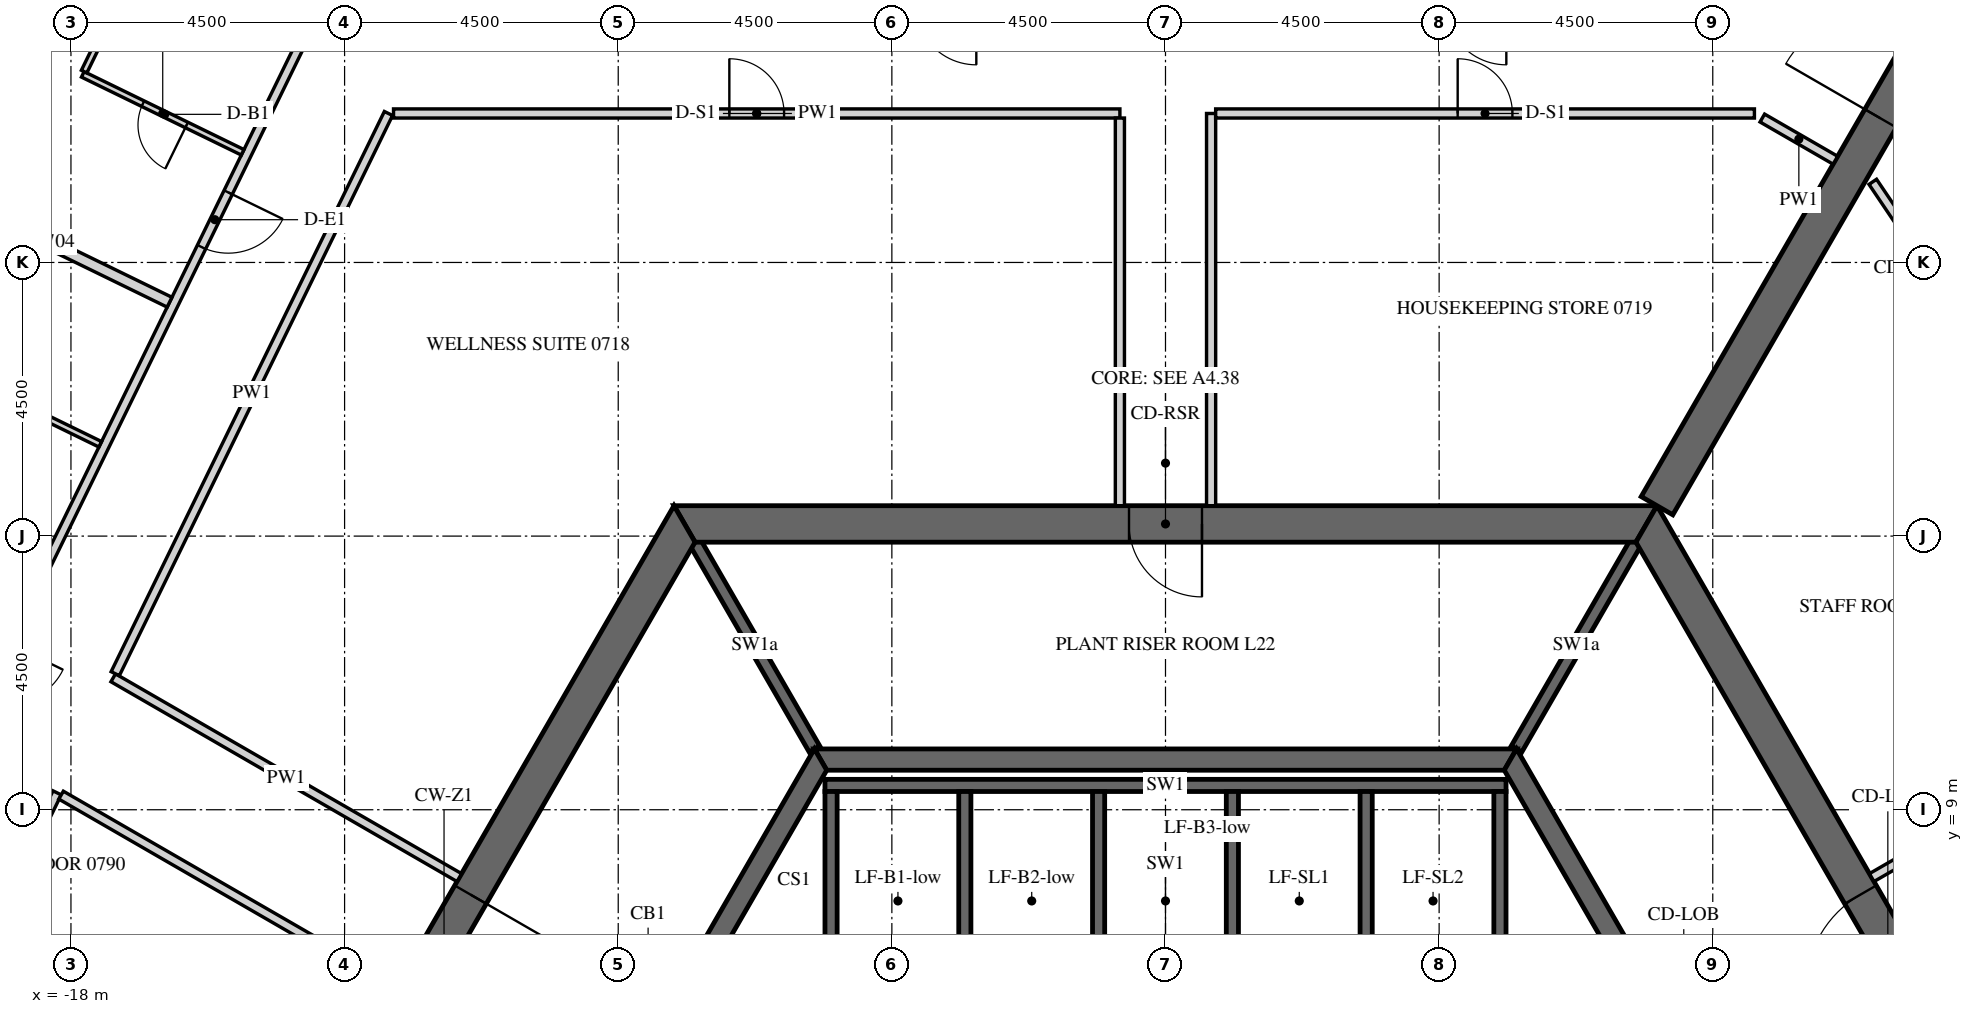
"""IFC4 building model, lengths in metres.
Left out: names, types, materials, properties, quantities, classifications, styles, units other than length and angle.
Written with IfcOpenShell. Run it as: python <this file> out.ifc"""

import sys

from ifc_helpers import new_model, si_unit, direction, frame, frame_2d, origin, place, context, subcontext, project, spatial, polyline, rectangle, outline, extrude, element, fill, save


model = new_model("IFC4")
c1 = context("Model", 3, precision=1e-05, world=origin(), true_north=direction((0.0, 1.0)))
c2 = subcontext(c1, "Body", "Model", "MODEL_VIEW")
j1 = project(units=[si_unit("LENGTHUNIT", "METRE"), si_unit("PLANEANGLEUNIT", "RADIAN")], contexts=[c1])
p1 = place(None, origin())
s1 = spatial("IfcSite", under=j1, at=p1, CompositionType="ELEMENT")
p2 = place(p1, origin())
s2 = spatial("IfcBuilding", under=s1, at=p2, CompositionType="ELEMENT")
p3 = place(p2, frame((0.0, 0.0, 99.9)))
s3 = spatial("IfcBuildingStorey", under=s2, at=p3, CompositionType="ELEMENT", Elevation=99.9)
p4 = place(p3, frame((-7.91, 13.7, -0.15), z_axis=(0.0, 0.0, 1.0), x_axis=(-0.499999880136, -0.866025472988, 0.0)))
e1 = element("IfcWall", 1, at=p4, inside=s3, PredefinedType="SHEAR", context=c2, shape_type="SweptSolid", body=[
    extrude(outline(polyline([(-0.173, -0.3), (15.993, -0.3), (15.646, 0.3), (0.173, 0.3), (-0.173, -0.3)])), origin(), (0.0, 0.0, 1.0), 3.9),
])
p5 = place(p4, frame((7.039, 0.0, 0.15)))
e2 = element("IfcOpeningElement", 2, at=p5, cuts=e1, PredefinedType="OPENING", context=c2, shape_type="SweptSolid", body=[
    extrude(rectangle(XDim=1.8, YDim=2.4, at=frame_2d((0.9, 1.2))), frame((0.0, 0.31, 0.0), z_axis=(0.0, -1.0, 0.0), x_axis=(1.0, 0.0, 0.0)), (0.0, 0.0, 1.0), 0.62),
])
p6 = place(p3, frame((15.819, 0.0, -0.15), z_axis=(0.0, 0.0, 1.0), x_axis=(-0.499999880136, 0.866025472988, 0.0)))
e3 = element("IfcWall", 3, at=p6, inside=s3, PredefinedType="SHEAR", context=c2, shape_type="SweptSolid", body=[
    extrude(outline(polyline([(-0.173, -0.3), (15.993, -0.3), (15.646, 0.3), (0.173, 0.3), (-0.173, -0.3)])), origin(), (0.0, 0.0, 1.0), 3.9),
])
p7 = place(p6, frame((6.981, 0.0, 0.15)))
e4 = element("IfcOpeningElement", 4, at=p7, cuts=e3, PredefinedType="OPENING", context=c2, shape_type="SweptSolid", body=[
    extrude(rectangle(XDim=1.8, YDim=2.4, at=frame_2d((0.9, 1.2))), frame((0.0, 0.31, 0.0), z_axis=(0.0, -1.0, 0.0), x_axis=(1.0, 0.0, 0.0)), (0.0, 0.0, 1.0), 0.62),
])
p8 = place(p3, frame((7.91, 13.7, -0.15), z_axis=(0.0, 0.0, 1.0), x_axis=(-1.0, 0.0, 0.0)))
e5 = element("IfcWall", 5, at=p8, inside=s3, PredefinedType="SHEAR", context=c2, shape_type="SweptSolid", body=[
    extrude(outline(polyline([(-0.173, -0.3), (15.993, -0.3), (15.646, 0.3), (0.173, 0.3), (-0.173, -0.3)])), origin(), (0.0, 0.0, 1.0), 3.9),
])
p9 = place(p8, frame((7.31, 0.0, 0.15)))
e6 = element("IfcOpeningElement", 6, at=p9, cuts=e5, PredefinedType="OPENING", context=c2, shape_type="SweptSolid", body=[
    extrude(rectangle(XDim=1.2, YDim=2.4, at=frame_2d((0.6, 1.2))), frame((0.0, 0.31, 0.0), z_axis=(0.0, -1.0, 0.0), x_axis=(1.0, 0.0, 0.0)), (0.0, 0.0, 1.0), 0.62),
])
p10 = place(p3, frame((8.083, 14.0, -0.15), z_axis=(0.0, 0.0, 1.0), x_axis=(0.499997680643, 0.866026742862, 0.0)))
e7 = element("IfcWall", 7, at=p10, inside=s3, PredefinedType="SHEAR", context=c2, shape_type="SweptSolid", body=[
    extrude(rectangle(XDim=16.509, YDim=0.6, at=frame_2d((8.254, 0.0))), origin(), (0.0, 0.0, 1.0), 3.9),
])
p11 = place(p10, frame((7.354, 0.0, 0.15)))
e8 = element("IfcOpeningElement", 8, at=p11, cuts=e7, PredefinedType="OPENING", context=c2, shape_type="SweptSolid", body=[
    extrude(rectangle(XDim=1.8, YDim=2.4, at=frame_2d((0.9, 1.2))), frame((0.0, 0.31, 0.0), z_axis=(0.0, -1.0, 0.0), x_axis=(1.0, 0.0, 0.0)), (0.0, 0.0, 1.0), 0.62),
])
p12 = place(p3, frame((-5.673, 9.825, -0.15), z_axis=(0.0, 0.0, 1.0), x_axis=(-0.499995046907, -0.866028263435, 0.0)))
e9 = element("IfcWall", 9, at=p12, inside=s3, PredefinedType="SHEAR", context=c2, shape_type="SweptSolid", body=[
    extrude(outline(polyline([(-0.101, -0.175), (11.446, -0.175), (11.244, 0.175), (0.101, 0.175), (-0.101, -0.175)])), origin(), (0.0, 0.0, 1.0), 3.9),
])
p13 = place(p12, frame((4.801, 0.0, 0.15)))
e10 = element("IfcOpeningElement", 10, at=p13, cuts=e9, PredefinedType="OPENING", context=c2, shape_type="SweptSolid", body=[
    extrude(rectangle(XDim=1.8, YDim=2.4, at=frame_2d((0.9, 1.2))), frame((0.0, 0.185, 0.0), z_axis=(0.0, -1.0, 0.0), x_axis=(1.0, 0.0, 0.0)), (0.0, 0.0, 1.0), 0.37),
])
p14 = place(p3, frame((11.345, 0.0, -0.15), z_axis=(0.0, 0.0, 1.0), x_axis=(-0.499995046907, 0.866028263435, 0.0)))
e11 = element("IfcWall", 11, at=p14, inside=s3, PredefinedType="SHEAR", context=c2, shape_type="SweptSolid", body=[
    extrude(outline(polyline([(-0.101, -0.175), (11.446, -0.175), (11.244, 0.175), (0.101, 0.175), (-0.101, -0.175)])), origin(), (0.0, 0.0, 1.0), 3.9),
])
p15 = place(p14, frame((4.744, 0.0, 0.15)))
e12 = element("IfcOpeningElement", 12, at=p15, cuts=e11, PredefinedType="OPENING", context=c2, shape_type="SweptSolid", body=[
    extrude(rectangle(XDim=1.8, YDim=2.4, at=frame_2d((0.9, 1.2))), frame((0.0, 0.185, 0.0), z_axis=(0.0, -1.0, 0.0), x_axis=(1.0, 0.0, 0.0)), (0.0, 0.0, 1.0), 0.37),
])
p16 = place(p3, frame((5.673, 9.825, -0.15), z_axis=(0.0, 0.0, 1.0), x_axis=(-1.0, 0.0, 0.0)))
e13 = element("IfcWall", 13, at=p16, inside=s3, PredefinedType="SHEAR", context=c2, shape_type="SweptSolid", body=[
    extrude(outline(polyline([(-0.101, -0.175), (11.446, -0.175), (11.244, 0.175), (0.101, 0.175), (-0.101, -0.175)])), origin(), (0.0, 0.0, 1.0), 3.9),
])
p17 = place(p3, frame((-5.6, 9.4, -0.25), z_axis=(0.0, 0.0, 1.0), x_axis=(1.0, 0.0, 0.0)))
e14 = element("IfcWall", 14, at=p17, inside=s3, PredefinedType="SHEAR", context=c2, shape_type="SweptSolid", body=[
    extrude(rectangle(XDim=11.2, YDim=0.2, at=frame_2d((5.6, 0.0))), origin(), (0.0, 0.0, 1.0), 3.9),
])
for number, where, z_axis, x_axis in (
    (15, (-5.5, 6.4, -0.25), (0.0, 0.0, 1.0), (0.0, 1.0, 0.0)),
    (16, (-3.3, 6.4, -0.25), (0.0, 0.0, 1.0), (0.0, 1.0, 0.0)),
    (17, (-1.1, 6.4, -0.25), (0.0, 0.0, 1.0), (0.0, 1.0, 0.0)),
    (18, (1.1, 6.4, -0.25), (0.0, 0.0, 1.0), (0.0, 1.0, 0.0)),
    (19, (3.3, 6.4, -0.25), (0.0, 0.0, 1.0), (0.0, 1.0, 0.0)),
    (20, (5.5, 6.4, -0.25), (0.0, 0.0, 1.0), (0.0, 1.0, 0.0)),
):
    element("IfcWall", number, at=place(p3, frame(where, z_axis=z_axis, x_axis=x_axis)), inside=s3, PredefinedType="SHEAR", context=c2, shape_type="SweptSolid", body=[
        extrude(rectangle(XDim=2.9, YDim=0.2, at=frame_2d((1.45, 0.0))), origin(), (0.0, 0.0, 1.0), 3.9),
    ])
for number, where, z_axis, x_axis in (
    (21, (5.773, 10.0, -0.15), (0.0, 0.0, 1.0), (0.5, 0.866, 0.0)),
    (22, (-5.773, 10.0, -0.15), (0.0, 0.0, 1.0), (-0.5, 0.866, 0.0)),
):
    element("IfcWall", number, at=place(p3, frame(where, z_axis=z_axis, x_axis=x_axis)), inside=s3, PredefinedType="SHEAR", context=c2, shape_type="SweptSolid", body=[
        extrude(rectangle(XDim=3.926, YDim=0.2, at=frame_2d((1.963, 0.0))), origin(), (0.0, 0.0, 1.0), 3.9),
    ])
p18 = place(p3, frame((-13.94, 22.175, 0.0), z_axis=(0.0, 0.0, 1.0), x_axis=(-0.438373022655, -0.898793131376, 0.0)))
e23 = element("IfcWall", 23, at=p18, inside=s3, PredefinedType="PARTITIONING", context=c2, shape_type="SweptSolid", body=[
    extrude(rectangle(XDim=22.335, YDim=0.15, at=frame_2d((11.168, 0.0))), origin(), (0.0, 0.0, 1.0), 2.988),
])
p19 = place(p18, frame((3.363, 0.0, 0.0)))
e24 = element("IfcOpeningElement", 24, at=p19, cuts=e23, PredefinedType="OPENING", context=c2, shape_type="SweptSolid", body=[
    extrude(rectangle(XDim=1.0, YDim=2.1, at=frame_2d((0.5, 1.05))), frame((0.0, 0.085, 0.0), z_axis=(0.0, -1.0, 0.0), x_axis=(1.0, 0.0, 0.0)), (0.0, 0.0, 1.0), 0.17),
])
p20 = place(p18, frame((11.609, 0.0, 0.0)))
e25 = element("IfcOpeningElement", 25, at=p20, cuts=e23, PredefinedType="OPENING", context=c2, shape_type="SweptSolid", body=[
    extrude(rectangle(XDim=1.0, YDim=2.1, at=frame_2d((0.5, 1.05))), frame((0.0, 0.085, 0.0), z_axis=(0.0, -1.0, 0.0), x_axis=(1.0, 0.0, 0.0)), (0.0, 0.0, 1.0), 0.17),
])
p21 = place(p18, frame((19.872, 0.0, 0.0)))
e26 = element("IfcOpeningElement", 26, at=p21, cuts=e23, PredefinedType="OPENING", context=c2, shape_type="SweptSolid", body=[
    extrude(rectangle(XDim=1.0, YDim=2.1, at=frame_2d((0.5, 1.05))), frame((0.0, 0.085, 0.0), z_axis=(0.0, -1.0, 0.0), x_axis=(1.0, 0.0, 0.0)), (0.0, 0.0, 1.0), 0.17),
])
p22 = place(p3, frame((-11.614, 7.884, 0.0), z_axis=(0.0, 0.0, 1.0), x_axis=(-0.866025963225, 0.49999903102, 0.0)))
e27 = element("IfcWall", 27, at=p22, inside=s3, PredefinedType="PARTITIONING", context=c2, shape_type="SweptSolid", body=[
    extrude(rectangle(XDim=6.571, YDim=0.15, at=frame_2d((3.286, 0.0))), origin(), (0.0, 0.0, 1.0), 2.988),
])
p23 = place(p3, frame((-17.272, 11.238, 0.0), z_axis=(0.0, 0.0, 1.0), x_axis=(0.438369193793, 0.898794998836, 0.0)))
e28 = element("IfcWall", 28, at=p23, inside=s3, PredefinedType="PARTITIONING", context=c2, shape_type="SweptSolid", body=[
    extrude(rectangle(XDim=10.25, YDim=0.15, at=frame_2d((5.125, 0.0))), origin(), (0.0, 0.0, 1.0), 2.988),
])
p24 = place(p3, frame((-12.695, 20.45, 0.0), z_axis=(0.0, 0.0, 1.0), x_axis=(1.0, 0.0, 0.0)))
e29 = element("IfcWall", 29, at=p24, inside=s3, PredefinedType="PARTITIONING", context=c2, shape_type="SweptSolid", body=[
    extrude(rectangle(XDim=11.945, YDim=0.15, at=frame_2d((5.973, 0.0))), origin(), (0.0, 0.0, 1.0), 2.988),
])
p25 = place(p24, frame((5.522, 0.0, 0.0)))
e30 = element("IfcOpeningElement", 30, at=p25, cuts=e29, PredefinedType="OPENING", context=c2, shape_type="SweptSolid", body=[
    extrude(rectangle(XDim=0.9, YDim=2.1, at=frame_2d((0.45, 1.05))), frame((0.0, 0.085, 0.0), z_axis=(0.0, -1.0, 0.0), x_axis=(1.0, 0.0, 0.0)), (0.0, 0.0, 1.0), 0.17),
])
p26 = place(p3, frame((-0.75, 20.375, 0.0), z_axis=(0.0, 0.0, 1.0), x_axis=(0.0, -1.0, 0.0)))
e31 = element("IfcWall", 31, at=p26, inside=s3, PredefinedType="PARTITIONING", context=c2, shape_type="SweptSolid", body=[
    extrude(rectangle(XDim=6.375, YDim=0.15, at=frame_2d((3.188, 0.0))), origin(), (0.0, 0.0, 1.0), 2.988),
])
p27 = place(p3, frame((0.75, 14.0, 0.0), z_axis=(0.0, 0.0, 1.0), x_axis=(0.0, 1.0, 0.0)))
e32 = element("IfcWall", 32, at=p27, inside=s3, PredefinedType="PARTITIONING", context=c2, shape_type="SweptSolid", body=[
    extrude(rectangle(XDim=6.45, YDim=0.15, at=frame_2d((3.225, 0.0))), origin(), (0.0, 0.0, 1.0), 2.988),
])
p28 = place(p3, frame((0.825, 20.45, 0.0), z_axis=(0.0, 0.0, 1.0), x_axis=(1.0, 0.0, 0.0)))
e33 = element("IfcWall", 33, at=p28, inside=s3, PredefinedType="PARTITIONING", context=c2, shape_type="SweptSolid", body=[
    extrude(rectangle(XDim=8.86, YDim=0.15, at=frame_2d((4.43, 0.0))), origin(), (0.0, 0.0, 1.0), 2.988),
])
p29 = place(p28, frame((3.98, 0.0, 0.0)))
e34 = element("IfcOpeningElement", 34, at=p29, cuts=e33, PredefinedType="OPENING", context=c2, shape_type="SweptSolid", body=[
    extrude(rectangle(XDim=0.9, YDim=2.1, at=frame_2d((0.45, 1.05))), frame((0.0, 0.085, 0.0), z_axis=(0.0, -1.0, 0.0), x_axis=(1.0, 0.0, 0.0)), (0.0, 0.0, 1.0), 0.17),
])
p30 = place(p3, frame((9.815, 20.375, 0.0), z_axis=(0.0, 0.0, 1.0), x_axis=(0.86600392025, -0.500037208726, 0.0)))
e35 = element("IfcWall", 35, at=p30, inside=s3, PredefinedType="PARTITIONING", context=c2, shape_type="SweptSolid", body=[
    extrude(rectangle(XDim=1.388, YDim=0.15, at=frame_2d((0.694, 0.0))), origin(), (0.0, 0.0, 1.0), 2.988),
])
p31 = place(p3, frame((-22.553, 0.41, 0.0), z_axis=(0.0, 0.0, 1.0), x_axis=(0.438382679221, 0.898788421465, 0.0)))
e36 = element("IfcWall", 36, at=p31, inside=s3, PredefinedType="PARTITIONING", context=c2, shape_type="SweptSolid", body=[
    extrude(rectangle(XDim=9.866, YDim=0.15, at=frame_2d((4.933, 0.0))), origin(), (0.0, 0.0, 1.0), 2.988),
])
p32 = place(p31, frame((4.483, 0.0, 0.0)))
e37 = element("IfcOpeningElement", 37, at=p32, cuts=e36, PredefinedType="OPENING", context=c2, shape_type="SweptSolid", body=[
    extrude(rectangle(XDim=0.9, YDim=2.1, at=frame_2d((0.45, 1.05))), frame((0.0, 0.085, 0.0), z_axis=(0.0, -1.0, 0.0), x_axis=(1.0, 0.0, 0.0)), (0.0, 0.0, 1.0), 0.17),
])
p33 = place(p3, frame((-18.162, 9.24, 0.0), z_axis=(0.0, 0.0, 1.0), x_axis=(0.866026781814, -0.499997613175, 0.0)))
e38 = element("IfcWall", 38, at=p33, inside=s3, PredefinedType="PARTITIONING", context=c2, shape_type="SweptSolid", body=[
    extrude(rectangle(XDim=6.349, YDim=0.15, at=frame_2d((3.175, 0.0))), origin(), (0.0, 0.0, 1.0), 2.988),
])
p34 = place(p3, frame((11.632, 19.326, 0.0), z_axis=(0.0, 0.0, 1.0), x_axis=(0.559193968377, -0.829036854266, 0.0)))
e39 = element("IfcWall", 39, at=p34, inside=s3, PredefinedType="PARTITIONING", context=c2, shape_type="SweptSolid", body=[
    extrude(rectangle(XDim=9.924, YDim=0.15, at=frame_2d((4.962, 0.0))), origin(), (0.0, 0.0, 1.0), 2.988),
])
p35 = place(p34, frame((4.512, 0.0, 0.0)))
e40 = element("IfcOpeningElement", 40, at=p35, cuts=e39, PredefinedType="OPENING", context=c2, shape_type="SweptSolid", body=[
    extrude(rectangle(XDim=0.9, YDim=2.1, at=frame_2d((0.45, 1.05))), frame((0.0, 0.085, 0.0), z_axis=(0.0, -1.0, 0.0), x_axis=(1.0, 0.0, 0.0)), (0.0, 0.0, 1.0), 0.17),
])
p36 = place(p3, frame((17.116, 11.061, 0.0), z_axis=(0.0, 0.0, 1.0), x_axis=(-0.866021127751, -0.500007406234, 0.0)))
e41 = element("IfcWall", 41, at=p36, inside=s3, PredefinedType="PARTITIONING", context=c2, shape_type="SweptSolid", body=[
    extrude(rectangle(XDim=6.354, YDim=0.15, at=frame_2d((3.177, 0.0))), origin(), (0.0, 0.0, 1.0), 2.988),
])
p37 = place(p3, frame((-15.176, 19.811, 0.0), z_axis=(0.0, 0.0, 1.0), x_axis=(-0.898790906006, 0.438377585285, 0.0)))
e42 = element("IfcWall", 42, at=p37, inside=s3, PredefinedType="PARTITIONING", context=c2, shape_type="SweptSolid", body=[
    extrude(rectangle(XDim=2.925, YDim=0.1, at=frame_2d((1.462, 0.0))), origin(), (0.0, 0.0, 1.0), 2.988),
])
p38 = place(p37, frame((1.025, 0.0, 0.0)))
e43 = element("IfcOpeningElement", 43, at=p38, cuts=e42, PredefinedType="OPENING", context=c2, shape_type="SweptSolid", body=[
    extrude(rectangle(XDim=0.8, YDim=2.1, at=frame_2d((0.4, 1.05))), frame((0.0, 0.06, 0.0), z_axis=(0.0, -1.0, 0.0), x_axis=(1.0, 0.0, 0.0)), (0.0, 0.0, 1.0), 0.12),
])
p39 = place(p3, frame((-17.783, 21.138, 0.0), z_axis=(0.0, 0.0, 1.0), x_axis=(0.438339704034, 0.898809381275, 0.0)))
e44 = element("IfcWall", 44, at=p39, inside=s3, PredefinedType="PARTITIONING", context=c2, shape_type="SweptSolid", body=[
    extrude(rectangle(XDim=2.35, YDim=0.1, at=frame_2d((1.175, 0.0))), origin(), (0.0, 0.0, 1.0), 2.988),
])
p40 = place(p3, frame((-22.782, 20.47, 0.0), z_axis=(0.0, 0.0, 1.0), x_axis=(0.898783593711, -0.438392577123, 0.0)))
e45 = element("IfcWall", 45, at=p40, inside=s3, PredefinedType="PARTITIONING", context=c2, shape_type="SweptSolid", body=[
    extrude(rectangle(XDim=7.125, YDim=0.18, at=frame_2d((3.562, 0.0))), origin(), (0.0, 0.0, 1.0), 2.988),
])
p41 = place(p3, frame((-17.518, 15.01, 0.0), z_axis=(0.0, 0.0, 1.0), x_axis=(-0.898791692788, 0.43837597217, 0.0)))
e46 = element("IfcWall", 46, at=p41, inside=s3, PredefinedType="PARTITIONING", context=c2, shape_type="SweptSolid", body=[
    extrude(rectangle(XDim=2.725, YDim=0.1, at=frame_2d((1.363, 0.0))), origin(), (0.0, 0.0, 1.0), 2.988),
])
p42 = place(p41, frame((0.925, 0.0, 0.0)))
e47 = element("IfcOpeningElement", 47, at=p42, cuts=e46, PredefinedType="OPENING", context=c2, shape_type="SweptSolid", body=[
    extrude(rectangle(XDim=0.8, YDim=2.1, at=frame_2d((0.4, 1.05))), frame((0.0, 0.06, 0.0), z_axis=(0.0, -1.0, 0.0), x_axis=(1.0, 0.0, 0.0)), (0.0, 0.0, 1.0), 0.12),
])
p43 = place(p5, origin())
e48 = element("IfcDoor", 48, at=p43, inside=s3, OperationType="DOUBLE_DOOR_SINGLE_SWING", PredefinedType="DOOR", context=c2, shape_type="SweptSolid", body=[
    extrude(rectangle(XDim=1.8, YDim=2.4, at=frame_2d((0.9, 1.2))), frame((0.0, 0.025, 0.0), z_axis=(0.0, -1.0, 0.0), x_axis=(1.0, 0.0, 0.0)), (0.0, 0.0, 1.0), 0.05),
])
fill(e2, e48)
p44 = place(p7, origin())
e49 = element("IfcDoor", 49, at=p44, inside=s3, OperationType="DOUBLE_DOOR_SINGLE_SWING", PredefinedType="DOOR", context=c2, shape_type="SweptSolid", body=[
    extrude(rectangle(XDim=1.8, YDim=2.4, at=frame_2d((0.9, 1.2))), frame((0.0, 0.025, 0.0), z_axis=(0.0, -1.0, 0.0), x_axis=(1.0, 0.0, 0.0)), (0.0, 0.0, 1.0), 0.05),
])
fill(e4, e49)
p45 = place(p9, origin())
e50 = element("IfcDoor", 50, at=p45, inside=s3, OperationType="SINGLE_SWING_LEFT", PredefinedType="DOOR", context=c2, shape_type="SweptSolid", body=[
    extrude(rectangle(XDim=1.2, YDim=2.4, at=frame_2d((0.6, 1.2))), frame((0.0, 0.025, 0.0), z_axis=(0.0, -1.0, 0.0), x_axis=(1.0, 0.0, 0.0)), (0.0, 0.0, 1.0), 0.05),
])
fill(e6, e50)
p46 = place(p11, origin())
e51 = element("IfcDoor", 51, at=p46, inside=s3, OperationType="DOUBLE_DOOR_SINGLE_SWING", PredefinedType="DOOR", context=c2, shape_type="SweptSolid", body=[
    extrude(rectangle(XDim=1.8, YDim=2.4, at=frame_2d((0.9, 1.2))), frame((0.0, 0.025, 0.0), z_axis=(0.0, -1.0, 0.0), x_axis=(1.0, 0.0, 0.0)), (0.0, 0.0, 1.0), 0.05),
])
fill(e8, e51)
p47 = place(p19, origin())
e52 = element("IfcDoor", 52, at=p47, inside=s3, OperationType="SINGLE_SWING_LEFT", PredefinedType="DOOR", context=c2, shape_type="SweptSolid", body=[
    extrude(rectangle(XDim=1.0, YDim=2.1, at=frame_2d((0.5, 1.05))), frame((0.0, 0.025, 0.0), z_axis=(0.0, -1.0, 0.0), x_axis=(1.0, 0.0, 0.0)), (0.0, 0.0, 1.0), 0.05),
])
fill(e24, e52)
p48 = place(p38, origin())
e53 = element("IfcDoor", 53, at=p48, inside=s3, OperationType="SINGLE_SWING_RIGHT", PredefinedType="DOOR", context=c2, shape_type="SweptSolid", body=[
    extrude(rectangle(XDim=0.8, YDim=2.1, at=frame_2d((0.4, 1.05))), frame((0.0, 0.025, 0.0), z_axis=(0.0, -1.0, 0.0), x_axis=(1.0, 0.0, 0.0)), (0.0, 0.0, 1.0), 0.05),
])
fill(e43, e53)
p49 = place(p25, origin())
e54 = element("IfcDoor", 54, at=p49, inside=s3, OperationType="SINGLE_SWING_RIGHT", PredefinedType="DOOR", context=c2, shape_type="SweptSolid", body=[
    extrude(rectangle(XDim=0.9, YDim=2.1, at=frame_2d((0.45, 1.05))), frame((0.0, 0.025, 0.0), z_axis=(0.0, -1.0, 0.0), x_axis=(1.0, 0.0, 0.0)), (0.0, 0.0, 1.0), 0.05),
])
fill(e30, e54)
p50 = place(p29, origin())
e55 = element("IfcDoor", 55, at=p50, inside=s3, OperationType="SINGLE_SWING_LEFT", PredefinedType="DOOR", context=c2, shape_type="SweptSolid", body=[
    extrude(rectangle(XDim=0.9, YDim=2.1, at=frame_2d((0.45, 1.05))), frame((0.0, 0.025, 0.0), z_axis=(0.0, -1.0, 0.0), x_axis=(1.0, 0.0, 0.0)), (0.0, 0.0, 1.0), 0.05),
])
fill(e34, e55)
save(model, sys.argv[1])
